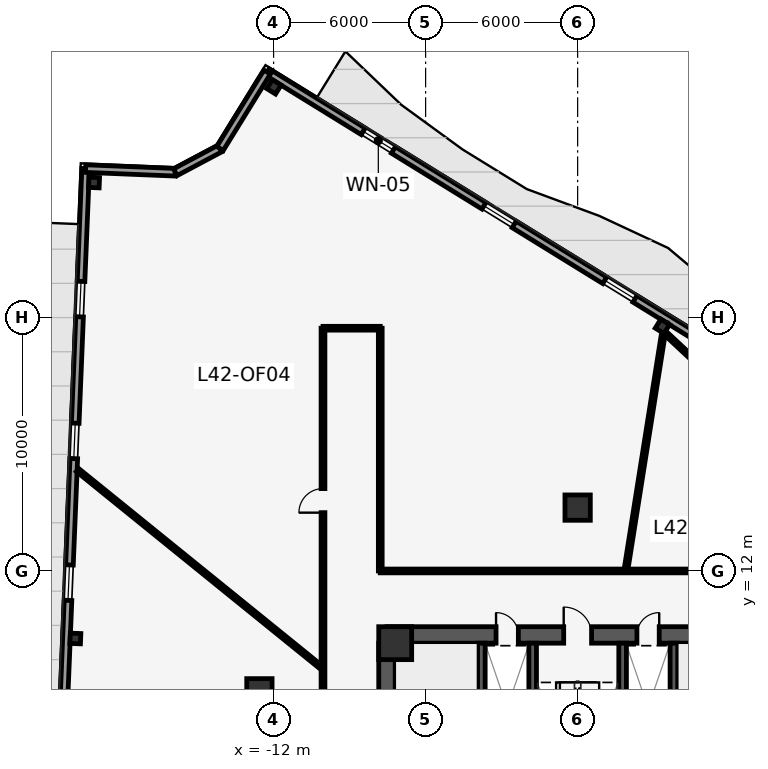
"""IFC4 building model, lengths in metres.
Left out: names, types, materials, properties, quantities, classifications, styles, units other than length and angle.
Written with IfcOpenShell. Run it as: python <this file> out.ifc"""

import sys

from ifc_helpers import new_model, si_unit, direction, frame, frame_2d, origin, origin_2d, place, context, subcontext, project, spatial, rectangle, i_section, extrude, element, fill, save


model = new_model("IFC4")
c1 = context("Model", 3, precision=1e-05, world=origin(), true_north=direction((0.0, 1.0)))
c2 = subcontext(c1, "Body", "Model", "MODEL_VIEW")
j1 = project(units=[si_unit("LENGTHUNIT", "METRE"), si_unit("PLANEANGLEUNIT", "RADIAN")], contexts=[c1])
p1 = place(None, origin())
s1 = spatial("IfcSite", under=j1, at=p1, CompositionType="ELEMENT")
p2 = place(p1, origin())
s2 = spatial("IfcBuilding", under=s1, at=p2, CompositionType="ELEMENT")
p3 = place(p2, frame((0.0, 0.0, 181.9)))
s3 = spatial("IfcBuildingStorey", under=s2, at=p3, CompositionType="ELEMENT", Elevation=181.9)
p4 = place(p3, frame((-7.525, 9.475, 0.0), z_axis=(0.0, 0.0, 1.0), x_axis=(1.0, 0.0, 0.0)))
e1 = element("IfcWall", 1, at=p4, inside=s3, PredefinedType="SHEAR", context=c2, shape_type="SweptSolid", body=[
    extrude(rectangle(XDim=15.05, YDim=0.65, at=frame_2d((7.525, 0.0))), origin(), (0.0, 0.0, 1.0), 3.85),
])
p5 = place(p4, frame((6.975, 0.0, 0.0)))
e2 = element("IfcOpeningElement", 2, at=p5, cuts=e1, PredefinedType="OPENING", context=c2, shape_type="SweptSolid", body=[
    extrude(rectangle(XDim=1.1, YDim=2.15, at=frame_2d((0.55, 1.075))), frame((0.0, 0.335, 0.0), z_axis=(0.0, -1.0, 0.0), x_axis=(1.0, 0.0, 0.0)), (0.0, 0.0, 1.0), 0.67),
])
p6 = place(p4, frame((4.305, 0.0, 0.0)))
e3 = element("IfcOpeningElement", 3, at=p6, cuts=e1, PredefinedType="OPENING", context=c2, shape_type="SweptSolid", body=[
    extrude(rectangle(XDim=0.88, YDim=2.15, at=frame_2d((0.44, 1.075))), frame((0.0, 0.335, 0.0), z_axis=(0.0, -1.0, 0.0), x_axis=(1.0, 0.0, 0.0)), (0.0, 0.0, 1.0), 0.67),
])
p7 = place(p4, frame((9.865, 0.0, 0.0)))
e4 = element("IfcOpeningElement", 4, at=p7, cuts=e1, PredefinedType="OPENING", context=c2, shape_type="SweptSolid", body=[
    extrude(rectangle(XDim=0.88, YDim=2.15, at=frame_2d((0.44, 1.075))), frame((0.0, 0.335, 0.0), z_axis=(0.0, -1.0, 0.0), x_axis=(1.0, 0.0, 0.0)), (0.0, 0.0, 1.0), 0.67),
])
for number, where, z_axis, x_axis in (
    (5, (-3.8, 1.45, 0.0), (0.0, 0.0, 1.0), (0.0, 1.0, 0.0)),
    (6, (-1.775, 1.45, 0.0), (0.0, 0.0, 1.0), (0.0, 1.0, 0.0)),
    (7, (1.775, 1.45, 0.0), (0.0, 0.0, 1.0), (0.0, 1.0, 0.0)),
    (8, (3.8, 1.45, 0.0), (0.0, 0.0, 1.0), (0.0, 1.0, 0.0)),
):
    element("IfcWall", number, at=place(p3, frame(where, z_axis=z_axis, x_axis=x_axis)), inside=s3, PredefinedType="SHEAR", context=c2, shape_type="SweptSolid", body=[
        extrude(rectangle(XDim=7.7, YDim=0.3, at=frame_2d((3.85, 0.0))), origin(), (0.0, 0.0, 1.0), 3.85),
    ])
p8 = place(p3, frame((-7.525, 0.1, 0.0), z_axis=(0.0, 0.0, 1.0), x_axis=(0.0, 1.0, 0.0)))
e9 = element("IfcWall", 9, at=p8, inside=s3, PredefinedType="SHEAR", context=c2, shape_type="SweptSolid", body=[
    extrude(rectangle(XDim=9.05, YDim=0.65, at=frame_2d((4.525, 0.0))), origin(), (0.0, 0.0, 1.0), 3.85),
])
p9 = place(p3, frame((-7.2, 9.15, 0.0), z_axis=(0.0, 0.0, 1.0), x_axis=(1.0, 0.0, 0.0)))
e10 = element("IfcColumn", 10, at=p9, inside=s3, PredefinedType="COLUMN", context=c2, shape_type="SweptSolid", body=[
    extrude(rectangle(XDim=1.3, YDim=1.3, at=origin_2d()), origin(), (0.0, 0.0, 1.0), 4.1),
])
for number, where, z_axis, x_axis in (
    (11, (0.0, 14.5, 0.0), (0.0, 0.0, 1.0), (1.0, 0.0, 0.0)),
    (12, (-12.56, 7.25, 0.0), (0.0, 0.0, 1.0), (1.0, 0.0, 0.0)),
):
    element("IfcColumn", number, at=place(p3, frame(where, z_axis=z_axis, x_axis=x_axis)), inside=s3, PredefinedType="COLUMN", context=c2, shape_type="SweptSolid", body=[
        extrude(rectangle(XDim=1.0, YDim=1.0, at=origin_2d()), origin(), (0.0, 0.0, 1.0), 4.1),
    ])
for number, where, z_axis, x_axis in (
    (13, (-19.086, 27.331, 0.0), (0.0, 0.0, 1.0), (0.041, 0.999, 0.0)),
    (14, (-19.824, 9.335, 0.0), (0.0, 0.0, 1.0), (0.041, 0.999, 0.0)),
    (15, (3.346, 21.655, 0.0), (0.0, 0.0, 1.0), (-0.851, 0.525, 0.0)),
    (16, (-11.986, 31.107, 0.0), (0.0, 0.0, 1.0), (-0.851, 0.525, 0.0)),
):
    element("IfcColumn", number, at=place(p3, frame(where, z_axis=z_axis, x_axis=x_axis)), inside=s3, PredefinedType="COLUMN", context=c2, shape_type="SweptSolid", body=[
        extrude(i_section(OverallWidth=0.406, OverallDepth=0.417, WebThickness=0.03, FlangeThickness=0.048, at=origin_2d()), origin(), (0.0, 0.0, 1.0), 4.1),
    ])
p10 = place(p3, frame((-12.255, 31.689, 0.0), z_axis=(0.0, 0.0, 1.0), x_axis=(0.851166647402, -0.524895549944, 0.0)))
e17 = element("IfcWall", 17, at=p10, inside=s3, PredefinedType="STANDARD", context=c2, shape_type="SweptSolid", body=[
    extrude(rectangle(XDim=55.111, YDim=0.3, at=frame_2d((27.555, 0.0))), origin(), (0.0, 0.0, 1.0), 3.85),
])
p11 = place(p10, frame((27.055, 0.0, 0.0)))
e18 = element("IfcOpeningElement", 18, at=p11, cuts=e17, PredefinedType="OPENING", context=c2, shape_type="SweptSolid", body=[
    extrude(rectangle(XDim=1.0, YDim=2.15, at=frame_2d((0.5, 1.075))), frame((0.0, 0.16, 0.0), z_axis=(0.0, -1.0, 0.0), x_axis=(1.0, 0.0, 0.0)), (0.0, 0.0, 1.0), 0.32),
])
p12 = place(p10, frame((4.455, 0.0, 0.85)))
e19 = element("IfcOpeningElement", 19, at=p12, cuts=e17, PredefinedType="OPENING", context=c2, shape_type="SweptSolid", body=[
    extrude(rectangle(XDim=1.4, YDim=2.2, at=frame_2d((0.7, 1.1))), frame((0.0, 0.16, 0.0), z_axis=(0.0, -1.0, 0.0), x_axis=(1.0, 0.0, 0.0)), (0.0, 0.0, 1.0), 0.32),
])
p13 = place(p10, frame((10.055, 0.0, 0.85)))
e20 = element("IfcOpeningElement", 20, at=p13, cuts=e17, PredefinedType="OPENING", context=c2, shape_type="SweptSolid", body=[
    extrude(rectangle(XDim=1.4, YDim=2.2, at=frame_2d((0.7, 1.1))), frame((0.0, 0.16, 0.0), z_axis=(0.0, -1.0, 0.0), x_axis=(1.0, 0.0, 0.0)), (0.0, 0.0, 1.0), 0.32),
])
p14 = place(p10, frame((15.655, 0.0, 0.85)))
e21 = element("IfcOpeningElement", 21, at=p14, cuts=e17, PredefinedType="OPENING", context=c2, shape_type="SweptSolid", body=[
    extrude(rectangle(XDim=1.4, YDim=2.2, at=frame_2d((0.7, 1.1))), frame((0.0, 0.16, 0.0), z_axis=(0.0, -1.0, 0.0), x_axis=(1.0, 0.0, 0.0)), (0.0, 0.0, 1.0), 0.32),
])
p15 = place(p10, frame((21.255, 0.0, 0.85)))
e22 = element("IfcOpeningElement", 22, at=p15, cuts=e17, PredefinedType="OPENING", context=c2, shape_type="SweptSolid", body=[
    extrude(rectangle(XDim=1.4, YDim=2.2, at=frame_2d((0.7, 1.1))), frame((0.0, 0.16, 0.0), z_axis=(0.0, -1.0, 0.0), x_axis=(1.0, 0.0, 0.0)), (0.0, 0.0, 1.0), 0.32),
])
p16 = place(p10, frame((32.455, 0.0, 0.85)))
e23 = element("IfcOpeningElement", 23, at=p16, cuts=e17, PredefinedType="OPENING", context=c2, shape_type="SweptSolid", body=[
    extrude(rectangle(XDim=1.4, YDim=2.2, at=frame_2d((0.7, 1.1))), frame((0.0, 0.16, 0.0), z_axis=(0.0, -1.0, 0.0), x_axis=(1.0, 0.0, 0.0)), (0.0, 0.0, 1.0), 0.32),
])
p17 = place(p10, frame((38.055, 0.0, 0.85)))
e24 = element("IfcOpeningElement", 24, at=p17, cuts=e17, PredefinedType="OPENING", context=c2, shape_type="SweptSolid", body=[
    extrude(rectangle(XDim=1.4, YDim=2.2, at=frame_2d((0.7, 1.1))), frame((0.0, 0.16, 0.0), z_axis=(0.0, -1.0, 0.0), x_axis=(1.0, 0.0, 0.0)), (0.0, 0.0, 1.0), 0.32),
])
p18 = place(p10, frame((43.655, 0.0, 0.85)))
e25 = element("IfcOpeningElement", 25, at=p18, cuts=e17, PredefinedType="OPENING", context=c2, shape_type="SweptSolid", body=[
    extrude(rectangle(XDim=1.4, YDim=2.2, at=frame_2d((0.7, 1.1))), frame((0.0, 0.16, 0.0), z_axis=(0.0, -1.0, 0.0), x_axis=(1.0, 0.0, 0.0)), (0.0, 0.0, 1.0), 0.32),
])
p19 = place(p10, frame((49.255, 0.0, 0.85)))
e26 = element("IfcOpeningElement", 26, at=p19, cuts=e17, PredefinedType="OPENING", context=c2, shape_type="SweptSolid", body=[
    extrude(rectangle(XDim=1.4, YDim=2.2, at=frame_2d((0.7, 1.1))), frame((0.0, 0.16, 0.0), z_axis=(0.0, -1.0, 0.0), x_axis=(1.0, 0.0, 0.0)), (0.0, 0.0, 1.0), 0.32),
])
p20 = place(p3, frame((-21.667, -27.184, 0.0), z_axis=(0.0, 0.0, 1.0), x_axis=(0.040813869681, 0.999166766882, 0.0)))
e27 = element("IfcWall", 27, at=p20, inside=s3, PredefinedType="STANDARD", context=c2, shape_type="SweptSolid", body=[
    extrude(rectangle(XDim=55.11, YDim=0.3, at=frame_2d((27.555, 0.0))), origin(), (0.0, 0.0, 1.0), 3.85),
])
p21 = place(p20, frame((27.055, 0.0, 0.0)))
e28 = element("IfcOpeningElement", 28, at=p21, cuts=e27, PredefinedType="OPENING", context=c2, shape_type="SweptSolid", body=[
    extrude(rectangle(XDim=1.0, YDim=2.15, at=frame_2d((0.5, 1.075))), frame((0.0, 0.16, 0.0), z_axis=(0.0, -1.0, 0.0), x_axis=(1.0, 0.0, 0.0)), (0.0, 0.0, 1.0), 0.32),
])
p22 = place(p20, frame((4.455, 0.0, 0.85)))
e29 = element("IfcOpeningElement", 29, at=p22, cuts=e27, PredefinedType="OPENING", context=c2, shape_type="SweptSolid", body=[
    extrude(rectangle(XDim=1.4, YDim=2.2, at=frame_2d((0.7, 1.1))), frame((0.0, 0.16, 0.0), z_axis=(0.0, -1.0, 0.0), x_axis=(1.0, 0.0, 0.0)), (0.0, 0.0, 1.0), 0.32),
])
p23 = place(p20, frame((10.055, 0.0, 0.85)))
e30 = element("IfcOpeningElement", 30, at=p23, cuts=e27, PredefinedType="OPENING", context=c2, shape_type="SweptSolid", body=[
    extrude(rectangle(XDim=1.4, YDim=2.2, at=frame_2d((0.7, 1.1))), frame((0.0, 0.16, 0.0), z_axis=(0.0, -1.0, 0.0), x_axis=(1.0, 0.0, 0.0)), (0.0, 0.0, 1.0), 0.32),
])
p24 = place(p20, frame((21.255, 0.0, 0.85)))
e31 = element("IfcOpeningElement", 31, at=p24, cuts=e27, PredefinedType="OPENING", context=c2, shape_type="SweptSolid", body=[
    extrude(rectangle(XDim=1.4, YDim=2.2, at=frame_2d((0.7, 1.1))), frame((0.0, 0.16, 0.0), z_axis=(0.0, -1.0, 0.0), x_axis=(1.0, 0.0, 0.0)), (0.0, 0.0, 1.0), 0.32),
])
p25 = place(p20, frame((32.455, 0.0, 0.85)))
e32 = element("IfcOpeningElement", 32, at=p25, cuts=e27, PredefinedType="OPENING", context=c2, shape_type="SweptSolid", body=[
    extrude(rectangle(XDim=1.4, YDim=2.2, at=frame_2d((0.7, 1.1))), frame((0.0, 0.16, 0.0), z_axis=(0.0, -1.0, 0.0), x_axis=(1.0, 0.0, 0.0)), (0.0, 0.0, 1.0), 0.32),
])
p26 = place(p20, frame((38.055, 0.0, 0.85)))
e33 = element("IfcOpeningElement", 33, at=p26, cuts=e27, PredefinedType="OPENING", context=c2, shape_type="SweptSolid", body=[
    extrude(rectangle(XDim=1.4, YDim=2.2, at=frame_2d((0.7, 1.1))), frame((0.0, 0.16, 0.0), z_axis=(0.0, -1.0, 0.0), x_axis=(1.0, 0.0, 0.0)), (0.0, 0.0, 1.0), 0.32),
])
p27 = place(p20, frame((43.655, 0.0, 0.85)))
e34 = element("IfcOpeningElement", 34, at=p27, cuts=e27, PredefinedType="OPENING", context=c2, shape_type="SweptSolid", body=[
    extrude(rectangle(XDim=1.4, YDim=2.2, at=frame_2d((0.7, 1.1))), frame((0.0, 0.16, 0.0), z_axis=(0.0, -1.0, 0.0), x_axis=(1.0, 0.0, 0.0)), (0.0, 0.0, 1.0), 0.32),
])
p28 = place(p20, frame((49.255, 0.0, 0.85)))
e35 = element("IfcOpeningElement", 35, at=p28, cuts=e27, PredefinedType="OPENING", context=c2, shape_type="SweptSolid", body=[
    extrude(rectangle(XDim=1.4, YDim=2.2, at=frame_2d((0.7, 1.1))), frame((0.0, 0.16, 0.0), z_axis=(0.0, -1.0, 0.0), x_axis=(1.0, 0.0, 0.0)), (0.0, 0.0, 1.0), 0.32),
])
p29 = place(p3, frame((-19.418, 27.88, 0.0), z_axis=(0.0, 0.0, 1.0), x_axis=(0.999167250485, -0.040802028853, 0.0)))
e36 = element("IfcWall", 36, at=p29, inside=s3, PredefinedType="STANDARD", context=c2, shape_type="SweptSolid", body=[
    extrude(rectangle(XDim=3.542, YDim=0.3, at=frame_2d((1.771, 0.0))), origin(), (0.0, 0.0, 1.0), 3.85),
])
p30 = place(p3, frame((-15.879, 27.736, 0.0), z_axis=(0.0, 0.0, 1.0), x_axis=(0.882930579665, 0.469503558552, 0.0)))
e37 = element("IfcWall", 37, at=p30, inside=s3, PredefinedType="STANDARD", context=c2, shape_type="SweptSolid", body=[
    extrude(rectangle(XDim=1.998, YDim=0.3, at=frame_2d((0.999, 0.0))), origin(), (0.0, 0.0, 1.0), 3.85),
])
p31 = place(p3, frame((-14.115, 28.674, 0.0), z_axis=(0.0, 0.0, 1.0), x_axis=(0.524897025004, 0.851165737763, 0.0)))
e38 = element("IfcWall", 38, at=p31, inside=s3, PredefinedType="STANDARD", context=c2, shape_type="SweptSolid", body=[
    extrude(rectangle(XDim=3.542, YDim=0.3, at=frame_2d((1.771, 0.0))), origin(), (0.0, 0.0, 1.0), 3.85),
])
p32 = place(p3, frame((-10.05, 0.13, 0.0), z_axis=(0.0, 0.0, 1.0), x_axis=(0.0, 1.0, 0.0)))
e39 = element("IfcWall", 39, at=p32, inside=s3, PredefinedType="PARTITIONING", context=c2, shape_type="SweptSolid", body=[
    extrude(rectangle(XDim=21.45, YDim=0.15, at=frame_2d((10.725, 0.0))), origin(), (0.0, 0.0, 1.0), 3.85),
])
p33 = place(p32, frame((14.171, 0.0, 0.0)))
e40 = element("IfcOpeningElement", 40, at=p33, cuts=e39, PredefinedType="OPENING", context=c2, shape_type="SweptSolid", body=[
    extrude(rectangle(XDim=0.95, YDim=2.15, at=frame_2d((0.475, 1.075))), frame((0.0, 0.085, 0.0), z_axis=(0.0, -1.0, 0.0), x_axis=(1.0, 0.0, 0.0)), (0.0, 0.0, 1.0), 0.17),
])
p34 = place(p32, frame((3.699, 0.0, 0.0)))
e41 = element("IfcOpeningElement", 41, at=p34, cuts=e39, PredefinedType="OPENING", context=c2, shape_type="SweptSolid", body=[
    extrude(rectangle(XDim=0.95, YDim=2.15, at=frame_2d((0.475, 1.075))), frame((0.0, 0.085, 0.0), z_axis=(0.0, -1.0, 0.0), x_axis=(1.0, 0.0, 0.0)), (0.0, 0.0, 1.0), 0.17),
])
p35 = place(p3, frame((-10.05, 21.58, 0.0), z_axis=(0.0, 0.0, 1.0), x_axis=(1.0, 0.0, 0.0)))
e42 = element("IfcWall", 42, at=p35, inside=s3, PredefinedType="PARTITIONING", context=c2, shape_type="SweptSolid", body=[
    extrude(rectangle(XDim=2.26, YDim=0.15, at=frame_2d((1.13, 0.0))), origin(), (0.0, 0.0, 1.0), 3.85),
])
p36 = place(p3, frame((-7.79, 21.58, 0.0), z_axis=(0.0, 0.0, 1.0), x_axis=(0.0, -1.0, 0.0)))
e43 = element("IfcWall", 43, at=p36, inside=s3, PredefinedType="PARTITIONING", context=c2, shape_type="SweptSolid", body=[
    extrude(rectangle(XDim=9.58, YDim=0.15, at=frame_2d((4.79, 0.0))), origin(), (0.0, 0.0, 1.0), 3.85),
])
p37 = place(p3, frame((-7.79, 12.0, 0.0), z_axis=(0.0, 0.0, 1.0), x_axis=(1.0, 0.0, 0.0)))
e44 = element("IfcWall", 44, at=p37, inside=s3, PredefinedType="PARTITIONING", context=c2, shape_type="SweptSolid", body=[
    extrude(rectangle(XDim=15.58, YDim=0.15, at=frame_2d((7.79, 0.0))), origin(), (0.0, 0.0, 1.0), 3.85),
])
p38 = place(p3, frame((1.917, 12.105, 0.0), z_axis=(0.0, 0.0, 1.0), x_axis=(0.156446237386, 0.987686475967, 0.0)))
e45 = element("IfcWall", 45, at=p38, inside=s3, PredefinedType="PARTITIONING", context=c2, shape_type="SweptSolid", body=[
    extrude(rectangle(XDim=9.823, YDim=0.15, at=frame_2d((4.912, 0.0))), origin(), (0.0, 0.0, 1.0), 3.85),
])
p39 = place(p3, frame((-10.155, 8.223, 0.0), z_axis=(0.0, 0.0, 1.0), x_axis=(-0.777144819035, 0.629321801821, 0.0)))
e46 = element("IfcWall", 46, at=p39, inside=s3, PredefinedType="PARTITIONING", context=c2, shape_type="SweptSolid", body=[
    extrude(rectangle(XDim=12.332, YDim=0.15, at=frame_2d((6.166, 0.0))), origin(), (0.0, 0.0, 1.0), 3.85),
])
p40 = place(p3, frame((18.675, 7.196, 0.0), z_axis=(0.0, 0.0, 1.0), x_axis=(-0.731248253025, 0.682111422312, 0.0)))
e47 = element("IfcWall", 47, at=p40, inside=s3, PredefinedType="PARTITIONING", context=c2, shape_type="SweptSolid", body=[
    extrude(rectangle(XDim=20.863, YDim=0.15, at=frame_2d((10.432, 0.0))), origin(), (0.0, 0.0, 1.0), 3.85),
])
p41 = place(p40, frame((9.982, 0.0, 0.0)))
e48 = element("IfcOpeningElement", 48, at=p41, cuts=e47, PredefinedType="OPENING", context=c2, shape_type="SweptSolid", body=[
    extrude(rectangle(XDim=0.9, YDim=2.1, at=frame_2d((0.45, 1.05))), frame((0.0, 0.085, 0.0), z_axis=(0.0, -1.0, 0.0), x_axis=(1.0, 0.0, 0.0)), (0.0, 0.0, 1.0), 0.17),
])
p42 = place(p12, origin())
e49 = element("IfcWindow", 49, at=p42, inside=s3, PartitioningType="SINGLE_PANEL", PredefinedType="WINDOW", context=c2, shape_type="SweptSolid", body=[
    extrude(rectangle(XDim=1.4, YDim=2.2, at=frame_2d((0.7, 1.1))), frame((0.0, 0.03, 0.0), z_axis=(0.0, -1.0, 0.0), x_axis=(1.0, 0.0, 0.0)), (0.0, 0.0, 1.0), 0.06),
])
fill(e19, e49)
p43 = place(p13, origin())
e50 = element("IfcWindow", 50, at=p43, inside=s3, PartitioningType="SINGLE_PANEL", PredefinedType="WINDOW", context=c2, shape_type="SweptSolid", body=[
    extrude(rectangle(XDim=1.4, YDim=2.2, at=frame_2d((0.7, 1.1))), frame((0.0, 0.03, 0.0), z_axis=(0.0, -1.0, 0.0), x_axis=(1.0, 0.0, 0.0)), (0.0, 0.0, 1.0), 0.06),
])
fill(e20, e50)
p44 = place(p14, origin())
e51 = element("IfcWindow", 51, at=p44, inside=s3, PartitioningType="SINGLE_PANEL", PredefinedType="WINDOW", context=c2, shape_type="SweptSolid", body=[
    extrude(rectangle(XDim=1.4, YDim=2.2, at=frame_2d((0.7, 1.1))), frame((0.0, 0.03, 0.0), z_axis=(0.0, -1.0, 0.0), x_axis=(1.0, 0.0, 0.0)), (0.0, 0.0, 1.0), 0.06),
])
fill(e21, e51)
p45 = place(p26, origin())
e52 = element("IfcWindow", 52, at=p45, inside=s3, PartitioningType="SINGLE_PANEL", PredefinedType="WINDOW", context=c2, shape_type="SweptSolid", body=[
    extrude(rectangle(XDim=1.4, YDim=2.2, at=frame_2d((0.7, 1.1))), frame((0.0, 0.03, 0.0), z_axis=(0.0, -1.0, 0.0), x_axis=(1.0, 0.0, 0.0)), (0.0, 0.0, 1.0), 0.06),
])
fill(e33, e52)
p46 = place(p27, origin())
e53 = element("IfcWindow", 53, at=p46, inside=s3, PartitioningType="SINGLE_PANEL", PredefinedType="WINDOW", context=c2, shape_type="SweptSolid", body=[
    extrude(rectangle(XDim=1.4, YDim=2.2, at=frame_2d((0.7, 1.1))), frame((0.0, 0.03, 0.0), z_axis=(0.0, -1.0, 0.0), x_axis=(1.0, 0.0, 0.0)), (0.0, 0.0, 1.0), 0.06),
])
fill(e34, e53)
p47 = place(p28, origin())
e54 = element("IfcWindow", 54, at=p47, inside=s3, PartitioningType="SINGLE_PANEL", PredefinedType="WINDOW", context=c2, shape_type="SweptSolid", body=[
    extrude(rectangle(XDim=1.4, YDim=2.2, at=frame_2d((0.7, 1.1))), frame((0.0, 0.03, 0.0), z_axis=(0.0, -1.0, 0.0), x_axis=(1.0, 0.0, 0.0)), (0.0, 0.0, 1.0), 0.06),
])
fill(e35, e54)
p48 = place(p5, origin())
e55 = element("IfcDoor", 55, at=p48, inside=s3, OperationType="SINGLE_SWING_LEFT", PredefinedType="DOOR", context=c2, shape_type="SweptSolid", body=[
    extrude(rectangle(XDim=1.1, YDim=2.15, at=frame_2d((0.55, 1.075))), frame((0.0, 0.025, 0.0), z_axis=(0.0, -1.0, 0.0), x_axis=(1.0, 0.0, 0.0)), (0.0, 0.0, 1.0), 0.05),
])
fill(e2, e55)
p49 = place(p6, origin())
e56 = element("IfcDoor", 56, at=p49, inside=s3, OperationType="SINGLE_SWING_LEFT", PredefinedType="DOOR", context=c2, shape_type="SweptSolid", body=[
    extrude(rectangle(XDim=0.88, YDim=2.15, at=frame_2d((0.44, 1.075))), frame((0.0, 0.025, 0.0), z_axis=(0.0, -1.0, 0.0), x_axis=(1.0, 0.0, 0.0)), (0.0, 0.0, 1.0), 0.05),
])
fill(e3, e56)
p50 = place(p7, origin())
e57 = element("IfcDoor", 57, at=p50, inside=s3, OperationType="SINGLE_SWING_RIGHT", PredefinedType="DOOR", context=c2, shape_type="SweptSolid", body=[
    extrude(rectangle(XDim=0.88, YDim=2.15, at=frame_2d((0.44, 1.075))), frame((0.0, 0.025, 0.0), z_axis=(0.0, -1.0, 0.0), x_axis=(1.0, 0.0, 0.0)), (0.0, 0.0, 1.0), 0.05),
])
fill(e4, e57)
p51 = place(p33, origin())
e58 = element("IfcDoor", 58, at=p51, inside=s3, OperationType="SINGLE_SWING_LEFT", PredefinedType="DOOR", context=c2, shape_type="SweptSolid", body=[
    extrude(rectangle(XDim=0.95, YDim=2.15, at=frame_2d((0.475, 1.075))), frame((0.0, 0.025, 0.0), z_axis=(0.0, -1.0, 0.0), x_axis=(1.0, 0.0, 0.0)), (0.0, 0.0, 1.0), 0.05),
])
fill(e40, e58)
save(model, sys.argv[1])
